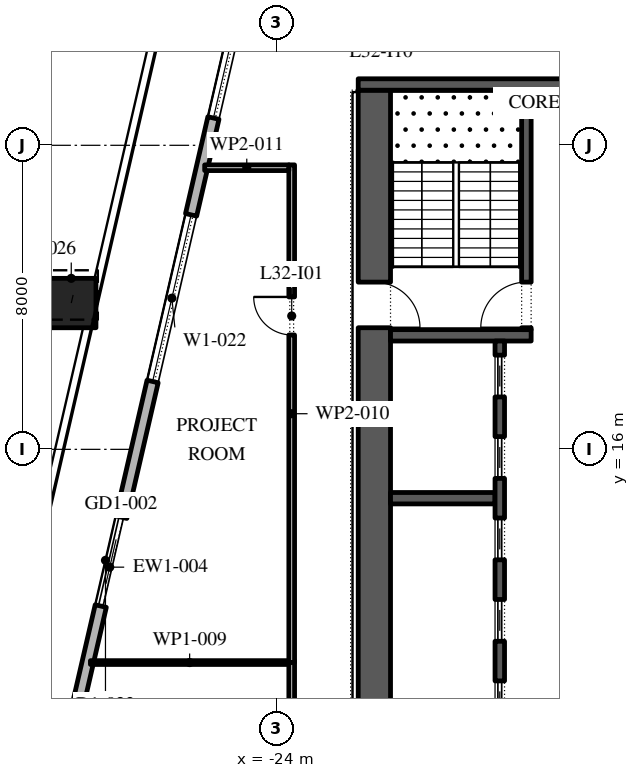
"""IFC4 building model, lengths in metres.
Left out: names, types, materials, properties, quantities, classifications, styles, units other than length and angle.
Written with IfcOpenShell. Run it as: python <this file> out.ifc"""

import sys

from ifc_helpers import new_model, si_unit, direction, frame, frame_2d, origin, origin_2d, place, context, subcontext, project, spatial, rectangle, extrude, element, fill, save


model = new_model("IFC4")
c1 = context("Model", 3, precision=1e-05, world=origin(), true_north=direction((0.0, 1.0)))
c2 = subcontext(c1, "Body", "Model", "MODEL_VIEW")
j1 = project(units=[si_unit("LENGTHUNIT", "METRE"), si_unit("PLANEANGLEUNIT", "RADIAN")], contexts=[c1])
p1 = place(None, origin())
s1 = spatial("IfcSite", under=j1, at=p1, CompositionType="ELEMENT")
p2 = place(p1, origin())
s2 = spatial("IfcBuilding", under=s1, at=p2, CompositionType="ELEMENT")
p3 = place(p2, frame((0.0, 0.0, 147.6)))
s3 = spatial("IfcBuildingStorey", under=s2, at=p3, CompositionType="ELEMENT", Elevation=147.6)
p4 = place(p3, frame((-29.401, 19.849, 0.0), z_axis=(0.011668267153, 0.050562490995, 0.998652735462), x_axis=(-0.974391195695, 0.224859506699, 0.0)))
e1 = element("IfcColumn", 1, at=p4, inside=s3, PredefinedType="COLUMN", context=c2, shape_type="SweptSolid", body=[
    extrude(rectangle(XDim=1.3, YDim=1.3, at=origin_2d()), origin(), (0.0, 0.0, 1.0), 4.206),
])
p5 = place(p3, frame((-22.82, 37.016, 0.0), z_axis=(0.0, 0.0, 1.0), x_axis=(-0.224953880882, -0.974369412223, 0.0)))
e2 = element("IfcWall", 2, at=p5, inside=s3, PredefinedType="STANDARD", context=c2, shape_type="SweptSolid", body=[
    extrude(rectangle(XDim=49.5, YDim=0.3, at=frame_2d((24.75, 0.0))), origin(), (0.0, 0.0, 1.0), 4.0),
])
p6 = place(p5, frame((1.157, 0.0, 0.45)))
e3 = element("IfcOpeningElement", 3, at=p6, cuts=e2, PredefinedType="OPENING", context=c2, shape_type="SweptSolid", body=[
    extrude(rectangle(XDim=4.5, YDim=3.05, at=frame_2d((2.25, 1.525))), frame((0.0, 0.16, 0.0), z_axis=(0.0, -1.0, 0.0), x_axis=(1.0, 0.0, 0.0)), (0.0, 0.0, 1.0), 0.32),
])
p7 = place(p5, frame((8.121, 0.0, 0.45)))
e4 = element("IfcOpeningElement", 4, at=p7, cuts=e2, PredefinedType="OPENING", context=c2, shape_type="SweptSolid", body=[
    extrude(rectangle(XDim=4.5, YDim=3.05, at=frame_2d((2.25, 1.525))), frame((0.0, 0.16, 0.0), z_axis=(0.0, -1.0, 0.0), x_axis=(1.0, 0.0, 0.0)), (0.0, 0.0, 1.0), 0.32),
])
p8 = place(p5, frame((15.236, 0.0, 0.45)))
e5 = element("IfcOpeningElement", 5, at=p8, cuts=e2, PredefinedType="OPENING", context=c2, shape_type="SweptSolid", body=[
    extrude(rectangle(XDim=4.5, YDim=3.05, at=frame_2d((2.25, 1.525))), frame((0.0, 0.16, 0.0), z_axis=(0.0, -1.0, 0.0), x_axis=(1.0, 0.0, 0.0)), (0.0, 0.0, 1.0), 0.32),
])
p9 = place(p5, frame((23.4, 0.0, 0.0)))
e6 = element("IfcOpeningElement", 6, at=p9, cuts=e2, PredefinedType="OPENING", context=c2, shape_type="SweptSolid", body=[
    extrude(rectangle(XDim=2.4, YDim=3.5, at=frame_2d((1.2, 1.75))), frame((0.0, 0.16, 0.0), z_axis=(0.0, -1.0, 0.0), x_axis=(1.0, 0.0, 0.0)), (0.0, 0.0, 1.0), 0.32),
])
p10 = place(p5, frame((29.464, 0.0, 0.45)))
e7 = element("IfcOpeningElement", 7, at=p10, cuts=e2, PredefinedType="OPENING", context=c2, shape_type="SweptSolid", body=[
    extrude(rectangle(XDim=4.5, YDim=2.875, at=frame_2d((2.25, 1.438))), frame((0.0, 0.16, 0.0), z_axis=(0.0, -1.0, 0.0), x_axis=(1.0, 0.0, 0.0)), (0.0, 0.0, 1.0), 0.32),
])
p11 = place(p5, frame((36.579, 0.0, 0.45)))
e8 = element("IfcOpeningElement", 8, at=p11, cuts=e2, PredefinedType="OPENING", context=c2, shape_type="SweptSolid", body=[
    extrude(rectangle(XDim=4.5, YDim=2.675, at=frame_2d((2.25, 1.337))), frame((0.0, 0.16, 0.0), z_axis=(0.0, -1.0, 0.0), x_axis=(1.0, 0.0, 0.0)), (0.0, 0.0, 1.0), 0.32),
])
p12 = place(p5, frame((43.693, 0.0, 0.45)))
e9 = element("IfcOpeningElement", 9, at=p12, cuts=e2, PredefinedType="OPENING", context=c2, shape_type="SweptSolid", body=[
    extrude(rectangle(XDim=4.5, YDim=3.05, at=frame_2d((2.25, 1.525))), frame((0.0, 0.16, 0.0), z_axis=(0.0, -1.0, 0.0), x_axis=(1.0, 0.0, 0.0)), (0.0, 0.0, 1.0), 0.32),
])
p13 = place(p3, frame((-21.425, -2.45, 0.0), z_axis=(0.0, 0.0, 1.0), x_axis=(0.0, 1.0, 0.0)))
e10 = element("IfcWall", 10, at=p13, inside=s3, PredefinedType="SHEAR", context=c2, shape_type="SweptSolid", body=[
    extrude(rectangle(XDim=27.9, YDim=0.85, at=frame_2d((13.95, 0.0))), origin(), (0.0, 0.0, 1.0), 4.0),
])
p14 = place(p13, frame((5.05, 0.0, 0.0)))
e11 = element("IfcOpeningElement", 11, at=p14, cuts=e10, PredefinedType="OPENING", context=c2, shape_type="SweptSolid", body=[
    extrude(rectangle(XDim=1.2, YDim=2.1, at=frame_2d((0.6, 1.05))), frame((0.0, 0.435, 0.0), z_axis=(0.0, -1.0, 0.0), x_axis=(1.0, 0.0, 0.0)), (0.0, 0.0, 1.0), 0.87),
])
p15 = place(p13, frame((21.65, 0.0, 0.0)))
e12 = element("IfcOpeningElement", 12, at=p15, cuts=e10, PredefinedType="OPENING", context=c2, shape_type="SweptSolid", body=[
    extrude(rectangle(XDim=1.2, YDim=2.1, at=frame_2d((0.6, 1.05))), frame((0.0, 0.435, 0.0), z_axis=(0.0, -1.0, 0.0), x_axis=(1.0, 0.0, 0.0)), (0.0, 0.0, 1.0), 0.87),
])
p16 = place(p3, frame((-21.85, 25.6, 0.0), z_axis=(0.0, 0.0, 1.0), x_axis=(1.0, 0.0, 0.0)))
e13 = element("IfcWall", 13, at=p16, inside=s3, PredefinedType="SHEAR", context=c2, shape_type="SweptSolid", body=[
    extrude(rectangle(XDim=11.7, YDim=0.3, at=frame_2d((5.85, 0.0))), origin(), (0.0, 0.0, 1.0), 4.0),
])
p17 = place(p3, frame((-21.0, 19.0, 0.0), z_axis=(0.0, 0.0, 1.0), x_axis=(1.0, 0.0, 0.0)))
e14 = element("IfcWall", 14, at=p17, inside=s3, PredefinedType="SHEAR", context=c2, shape_type="SweptSolid", body=[
    extrude(rectangle(XDim=3.7, YDim=0.3, at=frame_2d((1.85, 0.0))), origin(), (0.0, 0.0, 1.0), 4.0),
])
p18 = place(p3, frame((-17.425, 19.15, 0.0), z_axis=(0.0, 0.0, 1.0), x_axis=(0.0, 1.0, 0.0)))
e15 = element("IfcWall", 15, at=p18, inside=s3, PredefinedType="SHEAR", context=c2, shape_type="SweptSolid", body=[
    extrude(rectangle(XDim=6.3, YDim=0.25, at=frame_2d((3.15, 0.0))), origin(), (0.0, 0.0, 1.0), 4.0),
])
p19 = place(p18, frame((0.05, 0.0, 0.0)))
e16 = element("IfcOpeningElement", 16, at=p19, cuts=e15, PredefinedType="OPENING", context=c2, shape_type="SweptSolid", body=[
    extrude(rectangle(XDim=1.2, YDim=2.1, at=frame_2d((0.6, 1.05))), frame((0.0, 0.135, 0.0), z_axis=(0.0, -1.0, 0.0), x_axis=(1.0, 0.0, 0.0)), (0.0, 0.0, 1.0), 0.27),
])
p20 = place(p3, frame((-21.0, 14.714, 0.0), z_axis=(0.0, 0.0, 1.0), x_axis=(1.0, 0.0, 0.0)))
e17 = element("IfcWall", 17, at=p20, inside=s3, PredefinedType="SHEAR", context=c2, shape_type="SweptSolid", body=[
    extrude(rectangle(XDim=2.75, YDim=0.3, at=frame_2d((1.375, 0.0))), origin(), (0.0, 0.0, 1.0), 4.0),
])
p21 = place(p3, frame((-18.125, 4.15, 0.0), z_axis=(0.0, 0.0, 1.0), x_axis=(0.0, 1.0, 0.0)))
e18 = element("IfcWall", 18, at=p21, inside=s3, PredefinedType="SHEAR", context=c2, shape_type="SweptSolid", body=[
    extrude(rectangle(XDim=14.7, YDim=0.25, at=frame_2d((7.35, 0.0))), origin(), (0.0, 0.0, 1.0), 4.0),
])
p22 = place(p21, frame((0.371, 0.0, 0.0)))
e19 = element("IfcOpeningElement", 19, at=p22, cuts=e18, PredefinedType="OPENING", context=c2, shape_type="SweptSolid", body=[
    extrude(rectangle(XDim=1.1, YDim=2.1, at=frame_2d((0.55, 1.05))), frame((0.0, 0.135, 0.0), z_axis=(0.0, -1.0, 0.0), x_axis=(1.0, 0.0, 0.0)), (0.0, 0.0, 1.0), 0.27),
])
p23 = place(p21, frame((2.514, 0.0, 0.0)))
e20 = element("IfcOpeningElement", 20, at=p23, cuts=e18, PredefinedType="OPENING", context=c2, shape_type="SweptSolid", body=[
    extrude(rectangle(XDim=1.1, YDim=2.1, at=frame_2d((0.55, 1.05))), frame((0.0, 0.135, 0.0), z_axis=(0.0, -1.0, 0.0), x_axis=(1.0, 0.0, 0.0)), (0.0, 0.0, 1.0), 0.27),
])
p24 = place(p21, frame((4.657, 0.0, 0.0)))
e21 = element("IfcOpeningElement", 21, at=p24, cuts=e18, PredefinedType="OPENING", context=c2, shape_type="SweptSolid", body=[
    extrude(rectangle(XDim=1.1, YDim=2.1, at=frame_2d((0.55, 1.05))), frame((0.0, 0.135, 0.0), z_axis=(0.0, -1.0, 0.0), x_axis=(1.0, 0.0, 0.0)), (0.0, 0.0, 1.0), 0.27),
])
p25 = place(p21, frame((6.8, 0.0, 0.0)))
e22 = element("IfcOpeningElement", 22, at=p25, cuts=e18, PredefinedType="OPENING", context=c2, shape_type="SweptSolid", body=[
    extrude(rectangle(XDim=1.1, YDim=2.1, at=frame_2d((0.55, 1.05))), frame((0.0, 0.135, 0.0), z_axis=(0.0, -1.0, 0.0), x_axis=(1.0, 0.0, 0.0)), (0.0, 0.0, 1.0), 0.27),
])
p26 = place(p21, frame((8.943, 0.0, 0.0)))
e23 = element("IfcOpeningElement", 23, at=p26, cuts=e18, PredefinedType="OPENING", context=c2, shape_type="SweptSolid", body=[
    extrude(rectangle(XDim=1.1, YDim=2.1, at=frame_2d((0.55, 1.05))), frame((0.0, 0.135, 0.0), z_axis=(0.0, -1.0, 0.0), x_axis=(1.0, 0.0, 0.0)), (0.0, 0.0, 1.0), 0.27),
])
p27 = place(p21, frame((11.086, 0.0, 0.0)))
e24 = element("IfcOpeningElement", 24, at=p27, cuts=e18, PredefinedType="OPENING", context=c2, shape_type="SweptSolid", body=[
    extrude(rectangle(XDim=1.1, YDim=2.1, at=frame_2d((0.55, 1.05))), frame((0.0, 0.135, 0.0), z_axis=(0.0, -1.0, 0.0), x_axis=(1.0, 0.0, 0.0)), (0.0, 0.0, 1.0), 0.27),
])
p28 = place(p21, frame((13.229, 0.0, 0.0)))
e25 = element("IfcOpeningElement", 25, at=p28, cuts=e18, PredefinedType="OPENING", context=c2, shape_type="SweptSolid", body=[
    extrude(rectangle(XDim=1.1, YDim=2.1, at=frame_2d((0.55, 1.05))), frame((0.0, 0.135, 0.0), z_axis=(0.0, -1.0, 0.0), x_axis=(1.0, 0.0, 0.0)), (0.0, 0.0, 1.0), 0.27),
])
p29 = place(p3, frame((-23.6, -4.245, 0.0), z_axis=(0.0, 0.0, 1.0), x_axis=(0.0, 1.0, 0.0)))
e26 = element("IfcWall", 26, at=p29, inside=s3, PredefinedType="PARTITIONING", context=c2, shape_type="SweptSolid", body=[
    extrude(rectangle(XDim=14.685, YDim=0.15, at=frame_2d((7.343, 0.0))), origin(), (0.0, 0.0, 1.0), 4.0),
])
p30 = place(p29, frame((3.735, 0.0, 0.0)))
e27 = element("IfcOpeningElement", 27, at=p30, cuts=e26, PredefinedType="OPENING", context=c2, shape_type="SweptSolid", body=[
    extrude(rectangle(XDim=1.0, YDim=2.1, at=frame_2d((0.5, 1.05))), frame((0.0, 0.085, 0.0), z_axis=(0.0, -1.0, 0.0), x_axis=(1.0, 0.0, 0.0)), (0.0, 0.0, 1.0), 0.17),
])
p31 = place(p3, frame((-23.675, 10.39, 0.0), z_axis=(0.0, 0.0, 1.0), x_axis=(-1.0, 0.0, 0.0)))
e28 = element("IfcWall", 28, at=p31, inside=s3, PredefinedType="PARTITIONING", context=c2, shape_type="SweptSolid", body=[
    extrude(rectangle(XDim=5.221, YDim=0.1, at=frame_2d((2.61, 0.0))), origin(), (0.0, 0.0, 1.0), 4.0),
])
p32 = place(p3, frame((-23.6, 10.39, 0.0), z_axis=(0.0, 0.0, 1.0), x_axis=(0.0, 1.0, 0.0)))
e29 = element("IfcWall", 29, at=p32, inside=s3, PredefinedType="PARTITIONING", context=c2, shape_type="SweptSolid", body=[
    extrude(rectangle(XDim=13.095, YDim=0.15, at=frame_2d((6.548, 0.0))), origin(), (0.0, 0.0, 1.0), 4.0),
])
p33 = place(p32, frame((8.62, 0.0, 0.0)))
e30 = element("IfcOpeningElement", 30, at=p33, cuts=e29, PredefinedType="OPENING", context=c2, shape_type="SweptSolid", body=[
    extrude(rectangle(XDim=1.0, YDim=2.1, at=frame_2d((0.5, 1.05))), frame((0.0, 0.085, 0.0), z_axis=(0.0, -1.0, 0.0), x_axis=(1.0, 0.0, 0.0)), (0.0, 0.0, 1.0), 0.17),
])
p34 = place(p3, frame((-23.675, 23.41, 0.0), z_axis=(0.0, 0.0, 1.0), x_axis=(-1.0, 0.0, 0.0)))
e31 = element("IfcWall", 31, at=p34, inside=s3, PredefinedType="PARTITIONING", context=c2, shape_type="SweptSolid", body=[
    extrude(rectangle(XDim=2.215, YDim=0.15, at=frame_2d((1.107, 0.0))), origin(), (0.0, 0.0, 1.0), 4.0),
])
p35 = place(p7, origin())
e32 = element("IfcWindow", 32, at=p35, inside=s3, PartitioningType="DOUBLE_PANEL_VERTICAL", PredefinedType="WINDOW", context=c2, shape_type="SweptSolid", body=[
    extrude(rectangle(XDim=4.5, YDim=3.05, at=frame_2d((2.25, 1.525))), frame((0.0, 0.03, 0.0), z_axis=(0.0, -1.0, 0.0), x_axis=(1.0, 0.0, 0.0)), (0.0, 0.0, 1.0), 0.06),
])
fill(e4, e32)
p36 = place(p8, origin())
e33 = element("IfcWindow", 33, at=p36, inside=s3, PartitioningType="DOUBLE_PANEL_VERTICAL", PredefinedType="WINDOW", context=c2, shape_type="SweptSolid", body=[
    extrude(rectangle(XDim=4.5, YDim=3.05, at=frame_2d((2.25, 1.525))), frame((0.0, 0.03, 0.0), z_axis=(0.0, -1.0, 0.0), x_axis=(1.0, 0.0, 0.0)), (0.0, 0.0, 1.0), 0.06),
])
fill(e5, e33)
p37 = place(p9, origin())
e34 = element("IfcDoor", 34, at=p37, inside=s3, OperationType="DOUBLE_DOOR_SLIDING", PredefinedType="DOOR", context=c2, shape_type="SweptSolid", body=[
    extrude(rectangle(XDim=2.4, YDim=3.5, at=frame_2d((1.2, 1.75))), frame((0.0, 0.025, 0.0), z_axis=(0.0, -1.0, 0.0), x_axis=(1.0, 0.0, 0.0)), (0.0, 0.0, 1.0), 0.05),
])
fill(e6, e34)
p38 = place(p24, origin())
e35 = element("IfcDoor", 35, at=p38, inside=s3, OperationType="SLIDING_TO_LEFT", PredefinedType="DOOR", context=c2, shape_type="SweptSolid", body=[
    extrude(rectangle(XDim=1.1, YDim=2.1, at=frame_2d((0.55, 1.05))), frame((0.0, 0.025, 0.0), z_axis=(0.0, -1.0, 0.0), x_axis=(1.0, 0.0, 0.0)), (0.0, 0.0, 1.0), 0.05),
])
fill(e21, e35)
p39 = place(p25, origin())
e36 = element("IfcDoor", 36, at=p39, inside=s3, OperationType="SLIDING_TO_LEFT", PredefinedType="DOOR", context=c2, shape_type="SweptSolid", body=[
    extrude(rectangle(XDim=1.1, YDim=2.1, at=frame_2d((0.55, 1.05))), frame((0.0, 0.025, 0.0), z_axis=(0.0, -1.0, 0.0), x_axis=(1.0, 0.0, 0.0)), (0.0, 0.0, 1.0), 0.05),
])
fill(e22, e36)
p40 = place(p26, origin())
e37 = element("IfcDoor", 37, at=p40, inside=s3, OperationType="SLIDING_TO_LEFT", PredefinedType="DOOR", context=c2, shape_type="SweptSolid", body=[
    extrude(rectangle(XDim=1.1, YDim=2.1, at=frame_2d((0.55, 1.05))), frame((0.0, 0.025, 0.0), z_axis=(0.0, -1.0, 0.0), x_axis=(1.0, 0.0, 0.0)), (0.0, 0.0, 1.0), 0.05),
])
fill(e23, e37)
p41 = place(p27, origin())
e38 = element("IfcDoor", 38, at=p41, inside=s3, OperationType="SLIDING_TO_LEFT", PredefinedType="DOOR", context=c2, shape_type="SweptSolid", body=[
    extrude(rectangle(XDim=1.1, YDim=2.1, at=frame_2d((0.55, 1.05))), frame((0.0, 0.025, 0.0), z_axis=(0.0, -1.0, 0.0), x_axis=(1.0, 0.0, 0.0)), (0.0, 0.0, 1.0), 0.05),
])
fill(e24, e38)
p42 = place(p28, origin())
e39 = element("IfcDoor", 39, at=p42, inside=s3, OperationType="SLIDING_TO_LEFT", PredefinedType="DOOR", context=c2, shape_type="SweptSolid", body=[
    extrude(rectangle(XDim=1.1, YDim=2.1, at=frame_2d((0.55, 1.05))), frame((0.0, 0.025, 0.0), z_axis=(0.0, -1.0, 0.0), x_axis=(1.0, 0.0, 0.0)), (0.0, 0.0, 1.0), 0.05),
])
fill(e25, e39)
p43 = place(p19, origin())
e40 = element("IfcDoor", 40, at=p43, inside=s3, OperationType="SINGLE_SWING_RIGHT", PredefinedType="DOOR", context=c2, shape_type="SweptSolid", body=[
    extrude(rectangle(XDim=1.2, YDim=2.1, at=frame_2d((0.6, 1.05))), frame((0.0, 0.025, 0.0), z_axis=(0.0, -1.0, 0.0), x_axis=(1.0, 0.0, 0.0)), (0.0, 0.0, 1.0), 0.05),
])
fill(e16, e40)
p44 = place(p15, frame((1.2, 0.0, 0.0), z_axis=(0.0, 0.0, 1.0), x_axis=(-1.0, 0.0, 0.0)))
e41 = element("IfcDoor", 41, at=p44, inside=s3, OperationType="SINGLE_SWING_LEFT", PredefinedType="DOOR", context=c2, shape_type="SweptSolid", body=[
    extrude(rectangle(XDim=1.2, YDim=2.1, at=frame_2d((0.6, 1.05))), frame((0.0, 0.025, 0.0), z_axis=(0.0, -1.0, 0.0), x_axis=(1.0, 0.0, 0.0)), (0.0, 0.0, 1.0), 0.05),
])
fill(e12, e41)
p45 = place(p33, origin())
e42 = element("IfcDoor", 42, at=p45, inside=s3, OperationType="SINGLE_SWING_LEFT", PredefinedType="DOOR", context=c2, shape_type="SweptSolid", body=[
    extrude(rectangle(XDim=1.0, YDim=2.1, at=frame_2d((0.5, 1.05))), frame((0.0, 0.025, 0.0), z_axis=(0.0, -1.0, 0.0), x_axis=(1.0, 0.0, 0.0)), (0.0, 0.0, 1.0), 0.05),
])
fill(e30, e42)
save(model, sys.argv[1])
